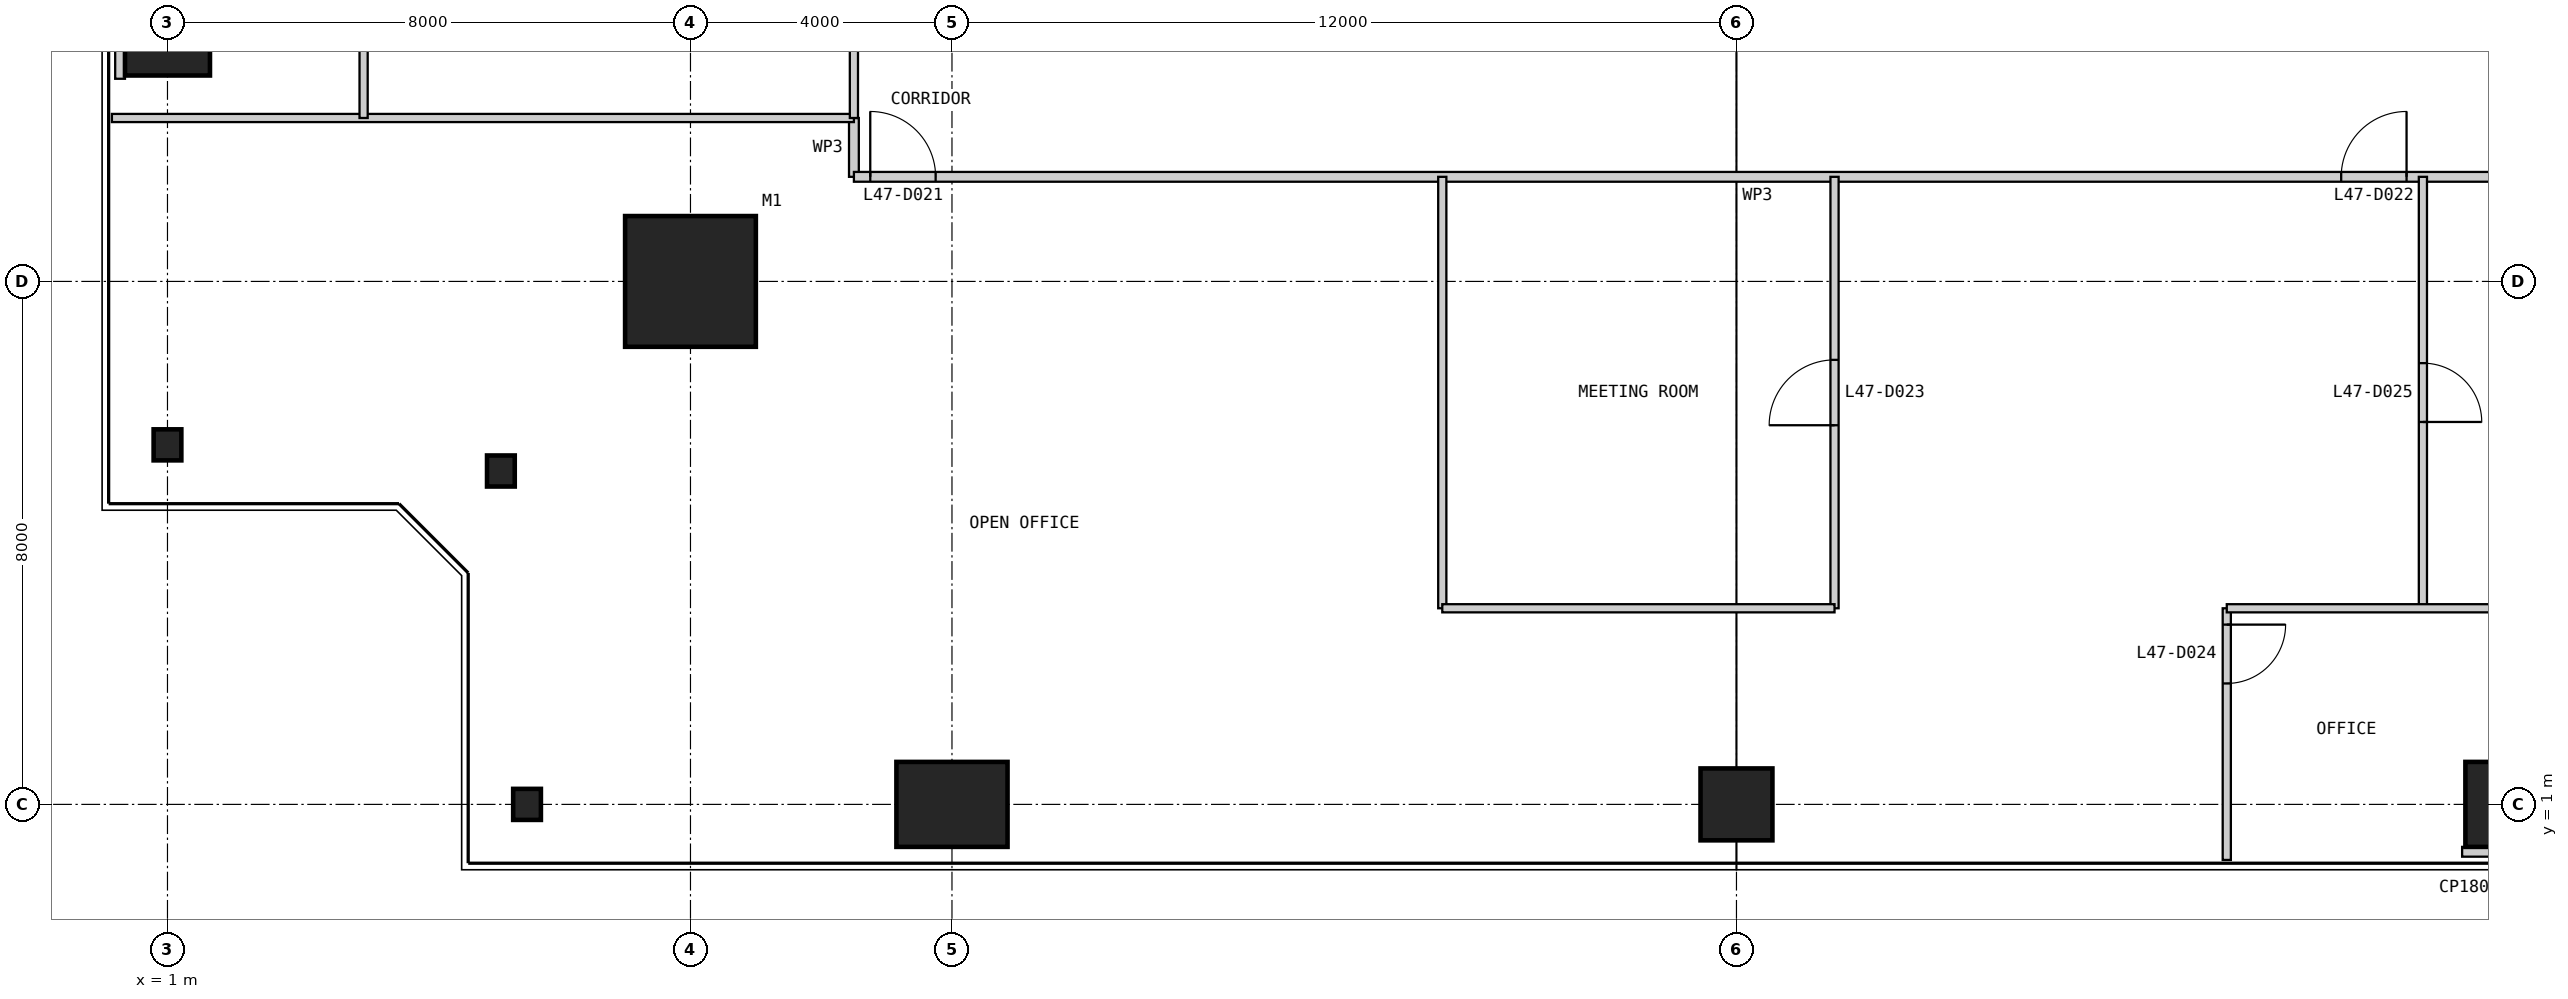
"""IFC4 building model, lengths in metres.
Left out: names, types, materials, properties, quantities, classifications, styles, units other than length and angle.
Written with IfcOpenShell. Run it as: python <this file> out.ifc"""

import sys

from ifc_helpers import new_model, si_unit, direction, frame, frame_2d, origin, origin_2d, place, context, subcontext, project, spatial, rectangle, i_section, extrude, element, fill, save


model = new_model("IFC4")
c1 = context("Model", 3, precision=1e-05, world=origin(), true_north=direction((0.0, 1.0)))
c2 = subcontext(c1, "Body", "Model", "MODEL_VIEW")
j1 = project(units=[si_unit("LENGTHUNIT", "METRE"), si_unit("PLANEANGLEUNIT", "RADIAN")], contexts=[c1])
p1 = place(None, origin())
s1 = spatial("IfcSite", under=j1, at=p1, CompositionType="ELEMENT")
p2 = place(p1, origin())
s2 = spatial("IfcBuilding", under=s1, at=p2, CompositionType="ELEMENT")
p3 = place(p2, frame((0.0, 0.0, 201.8)))
s3 = spatial("IfcBuildingStorey", under=s2, at=p3, CompositionType="ELEMENT", Elevation=201.8)
p4 = place(p3, frame((9.0, 9.0, 0.0), z_axis=(0.0, 0.0, 1.0), x_axis=(1.0, 0.0, 0.0)))
e1 = element("IfcColumn", 1, at=p4, inside=s3, PredefinedType="COLUMN", context=c2, shape_type="SweptSolid", body=[
    extrude(rectangle(XDim=2.0, YDim=2.0, at=origin_2d()), origin(), (0.0, 0.0, 1.0), 4.0),
])
p5 = place(p3, frame((6.5, 1.0, 0.0), z_axis=(0.0, 0.0, 1.0), x_axis=(1.0, 0.0, 0.0)))
e2 = element("IfcColumn", 2, at=p5, inside=s3, PredefinedType="COLUMN", context=c2, shape_type="SweptSolid", body=[
    extrude(i_section(OverallWidth=0.424, OverallDepth=0.475, WebThickness=0.048, FlangeThickness=0.077, at=origin_2d()), origin(), (0.0, 0.0, 1.0), 4.0),
])
p6 = place(p3, frame((13.0, 1.0, 0.0), z_axis=(0.0, 0.0, 1.0), x_axis=(1.0, 0.0, 0.0)))
e3 = element("IfcColumn", 3, at=p6, inside=s3, PredefinedType="COLUMN", context=c2, shape_type="SweptSolid", body=[
    extrude(rectangle(XDim=1.7, YDim=1.3, at=origin_2d()), origin(), (0.0, 0.0, 1.0), 4.0),
])
p7 = place(p3, frame((25.0, 1.0, 0.0), z_axis=(0.0, 0.0, 1.0), x_axis=(1.0, 0.0, 0.0)))
e4 = element("IfcColumn", 4, at=p7, inside=s3, PredefinedType="COLUMN", context=c2, shape_type="SweptSolid", body=[
    extrude(rectangle(XDim=1.1, YDim=1.1, at=origin_2d()), origin(), (0.0, 0.0, 1.0), 4.0),
])
p8 = place(p3, frame((37.0, 1.0, 0.0), z_axis=(0.0, 0.0, 1.0), x_axis=(1.0, 0.0, 0.0)))
e5 = element("IfcColumn", 5, at=p8, inside=s3, PredefinedType="COLUMN", context=c2, shape_type="SweptSolid", body=[
    extrude(rectangle(XDim=1.7, YDim=1.3, at=origin_2d()), origin(), (0.0, 0.0, 1.0), 4.0),
])
p9 = place(p3, frame((1.0, 13.0, 0.0), z_axis=(0.0, 0.0, 1.0), x_axis=(1.0, 0.0, 0.0)))
e6 = element("IfcColumn", 6, at=p9, inside=s3, PredefinedType="COLUMN", context=c2, shape_type="SweptSolid", body=[
    extrude(rectangle(XDim=1.3, YDim=1.7, at=origin_2d()), origin(), (0.0, 0.0, 1.0), 4.0),
])
for number, where, z_axis, x_axis in (
    (7, (1.0, 6.5, 0.0), (0.0, 0.0, 1.0), (1.0, 0.0, 0.0)),
    (8, (6.1, 6.1, 0.0), (0.0, 0.0, 1.0), (1.0, 0.0, 0.0)),
):
    element("IfcColumn", number, at=place(p3, frame(where, z_axis=z_axis, x_axis=x_axis)), inside=s3, PredefinedType="COLUMN", context=c2, shape_type="SweptSolid", body=[
        extrude(i_section(OverallWidth=0.424, OverallDepth=0.475, WebThickness=0.048, FlangeThickness=0.077, at=origin_2d()), origin(), (0.0, 0.0, 1.0), 4.0),
    ])
p10 = place(p3, frame((11.5, 11.5, 0.0), z_axis=(0.0, 0.0, 1.0), x_axis=(0.0, -1.0, 0.0)))
e9 = element("IfcWall", 9, at=p10, inside=s3, PredefinedType="PARTITIONING", context=c2, shape_type="SweptSolid", body=[
    extrude(rectangle(XDim=0.9, YDim=0.15, at=frame_2d((0.45, 0.0))), origin(), (0.0, 0.0, 1.0), 3.85),
])
p11 = place(p3, frame((11.5, 10.6, 0.0), z_axis=(0.0, 0.0, 1.0), x_axis=(1.0, 0.0, 0.0)))
e10 = element("IfcWall", 10, at=p11, inside=s3, PredefinedType="PARTITIONING", context=c2, shape_type="SweptSolid", body=[
    extrude(rectangle(XDim=27.0, YDim=0.15, at=frame_2d((13.5, 0.0))), origin(), (0.0, 0.0, 1.0), 3.85),
])
p12 = place(p11, frame((0.25, 0.0, 0.0)))
e11 = element("IfcOpeningElement", 11, at=p12, cuts=e10, PredefinedType="OPENING", context=c2, shape_type="SweptSolid", body=[
    extrude(rectangle(XDim=1.0, YDim=2.2, at=frame_2d((0.5, 1.1))), frame((0.0, 0.085, 0.0), z_axis=(0.0, -1.0, 0.0), x_axis=(1.0, 0.0, 0.0)), (0.0, 0.0, 1.0), 0.17),
])
p13 = place(p11, frame((22.75, 0.0, 0.0)))
e12 = element("IfcOpeningElement", 12, at=p13, cuts=e10, PredefinedType="OPENING", context=c2, shape_type="SweptSolid", body=[
    extrude(rectangle(XDim=1.0, YDim=2.2, at=frame_2d((0.5, 1.1))), frame((0.0, 0.085, 0.0), z_axis=(0.0, -1.0, 0.0), x_axis=(1.0, 0.0, 0.0)), (0.0, 0.0, 1.0), 0.17),
])
p14 = place(p3, frame((0.15, 11.5, 0.0), z_axis=(0.0, 0.0, 1.0), x_axis=(1.0, 0.0, 0.0)))
e13 = element("IfcWall", 13, at=p14, inside=s3, PredefinedType="PARTITIONING", context=c2, shape_type="SweptSolid", body=[
    extrude(rectangle(XDim=11.35, YDim=0.125, at=frame_2d((5.675, 0.0))), origin(), (0.0, 0.0, 1.0), 3.85),
])
p15 = place(p3, frame((20.5, 4.0, 0.0), z_axis=(0.0, 0.0, 1.0), x_axis=(0.0, 1.0, 0.0)))
e14 = element("IfcWall", 14, at=p15, inside=s3, PredefinedType="PARTITIONING", context=c2, shape_type="SweptSolid", body=[
    extrude(rectangle(XDim=6.6, YDim=0.125, at=frame_2d((3.3, 0.0))), origin(), (0.0, 0.0, 1.0), 3.85),
])
p16 = place(p3, frame((26.5, 4.0, 0.0), z_axis=(0.0, 0.0, 1.0), x_axis=(0.0, 1.0, 0.0)))
e15 = element("IfcWall", 15, at=p16, inside=s3, PredefinedType="PARTITIONING", context=c2, shape_type="SweptSolid", body=[
    extrude(rectangle(XDim=6.6, YDim=0.125, at=frame_2d((3.3, 0.0))), origin(), (0.0, 0.0, 1.0), 3.85),
])
p17 = place(p16, frame((2.8, 0.0, 0.0)))
e16 = element("IfcOpeningElement", 16, at=p17, cuts=e15, PredefinedType="OPENING", context=c2, shape_type="SweptSolid", body=[
    extrude(rectangle(XDim=1.0, YDim=2.2, at=frame_2d((0.5, 1.1))), frame((0.0, 0.073, 0.0), z_axis=(0.0, -1.0, 0.0), x_axis=(1.0, 0.0, 0.0)), (0.0, 0.0, 1.0), 0.145),
])
p18 = place(p3, frame((32.5, 0.15, 0.0), z_axis=(0.0, 0.0, 1.0), x_axis=(0.0, 1.0, 0.0)))
e17 = element("IfcWall", 17, at=p18, inside=s3, PredefinedType="PARTITIONING", context=c2, shape_type="SweptSolid", body=[
    extrude(rectangle(XDim=3.85, YDim=0.125, at=frame_2d((1.925, 0.0))), origin(), (0.0, 0.0, 1.0), 3.85),
])
p19 = place(p18, frame((2.7, 0.0, 0.0)))
e18 = element("IfcOpeningElement", 18, at=p19, cuts=e17, PredefinedType="OPENING", context=c2, shape_type="SweptSolid", body=[
    extrude(rectangle(XDim=0.9, YDim=2.2, at=frame_2d((0.45, 1.1))), frame((0.0, 0.073, 0.0), z_axis=(0.0, -1.0, 0.0), x_axis=(1.0, 0.0, 0.0)), (0.0, 0.0, 1.0), 0.145),
])
p20 = place(p3, frame((35.5, 4.0, 0.0), z_axis=(0.0, 0.0, 1.0), x_axis=(0.0, 1.0, 0.0)))
e19 = element("IfcWall", 19, at=p20, inside=s3, PredefinedType="PARTITIONING", context=c2, shape_type="SweptSolid", body=[
    extrude(rectangle(XDim=6.6, YDim=0.125, at=frame_2d((3.3, 0.0))), origin(), (0.0, 0.0, 1.0), 3.85),
])
p21 = place(p20, frame((2.85, 0.0, 0.0)))
e20 = element("IfcOpeningElement", 20, at=p21, cuts=e19, PredefinedType="OPENING", context=c2, shape_type="SweptSolid", body=[
    extrude(rectangle(XDim=0.9, YDim=2.2, at=frame_2d((0.45, 1.1))), frame((0.0, 0.073, 0.0), z_axis=(0.0, -1.0, 0.0), x_axis=(1.0, 0.0, 0.0)), (0.0, 0.0, 1.0), 0.145),
])
for number, where, z_axis, x_axis in (
    (21, (20.5, 4.0, 0.0), (0.0, 0.0, 1.0), (1.0, 0.0, 0.0)),
    (22, (32.5, 4.0, 0.0), (0.0, 0.0, 1.0), (1.0, 0.0, 0.0)),
):
    element("IfcWall", number, at=place(p3, frame(where, z_axis=z_axis, x_axis=x_axis)), inside=s3, PredefinedType="PARTITIONING", context=c2, shape_type="SweptSolid", body=[
        extrude(rectangle(XDim=6.0, YDim=0.125, at=frame_2d((3.0, 0.0))), origin(), (0.0, 0.0, 1.0), 3.85),
    ])
p22 = place(p3, frame((4.0, 17.5, 0.0), z_axis=(0.0, 0.0, 1.0), x_axis=(0.0, -1.0, 0.0)))
e23 = element("IfcWall", 23, at=p22, inside=s3, PredefinedType="PARTITIONING", context=c2, shape_type="SweptSolid", body=[
    extrude(rectangle(XDim=6.0, YDim=0.125, at=frame_2d((3.0, 0.0))), origin(), (0.0, 0.0, 1.0), 3.238),
])
p23 = place(p3, frame((11.5, 14.5, 0.0), z_axis=(0.0, 0.0, 1.0), x_axis=(0.0, -1.0, 0.0)))
e24 = element("IfcWall", 24, at=p23, inside=s3, PredefinedType="PARTITIONING", context=c2, shape_type="SweptSolid", body=[
    extrude(rectangle(XDim=3.0, YDim=0.125, at=frame_2d((1.5, 0.0))), origin(), (0.0, 0.0, 1.0), 3.85),
])
for number, where, z_axis, x_axis in (
    (25, (37.0, 0.2, 0.0), (0.0, 0.0, 1.0), (0.0, 1.0, 0.0)),
    (26, (0.2, 13.0, 0.0), (0.0, 0.0, 1.0), (1.0, 0.0, 0.0)),
):
    element("IfcWall", number, at=place(p3, frame(where, z_axis=z_axis, x_axis=x_axis)), inside=s3, PredefinedType="PARTITIONING", context=c2, shape_type="SweptSolid", body=[
        extrude(rectangle(XDim=0.15, YDim=1.8, at=frame_2d((0.075, 0.0))), origin(), (0.0, 0.0, 1.0), 3.85),
    ])
p24 = place(p12, origin())
e27 = element("IfcDoor", 27, at=p24, inside=s3, OperationType="SINGLE_SWING_LEFT", PredefinedType="DOOR", context=c2, shape_type="SweptSolid", body=[
    extrude(rectangle(XDim=1.0, YDim=2.2, at=frame_2d((0.5, 1.1))), frame((0.0, 0.025, 0.0), z_axis=(0.0, -1.0, 0.0), x_axis=(1.0, 0.0, 0.0)), (0.0, 0.0, 1.0), 0.05),
])
fill(e11, e27)
p25 = place(p13, origin())
e28 = element("IfcDoor", 28, at=p25, inside=s3, OperationType="SINGLE_SWING_RIGHT", PredefinedType="DOOR", context=c2, shape_type="SweptSolid", body=[
    extrude(rectangle(XDim=1.0, YDim=2.2, at=frame_2d((0.5, 1.1))), frame((0.0, 0.025, 0.0), z_axis=(0.0, -1.0, 0.0), x_axis=(1.0, 0.0, 0.0)), (0.0, 0.0, 1.0), 0.05),
])
fill(e12, e28)
p26 = place(p17, origin())
e29 = element("IfcDoor", 29, at=p26, inside=s3, OperationType="SINGLE_SWING_LEFT", PredefinedType="DOOR", context=c2, shape_type="SweptSolid", body=[
    extrude(rectangle(XDim=1.0, YDim=2.2, at=frame_2d((0.5, 1.1))), frame((0.0, 0.025, 0.0), z_axis=(0.0, -1.0, 0.0), x_axis=(1.0, 0.0, 0.0)), (0.0, 0.0, 1.0), 0.05),
])
fill(e16, e29)
p27 = place(p19, frame((0.9, 0.0, 0.0), z_axis=(0.0, 0.0, 1.0), x_axis=(-1.0, 0.0, 0.0)))
e30 = element("IfcDoor", 30, at=p27, inside=s3, OperationType="SINGLE_SWING_LEFT", PredefinedType="DOOR", context=c2, shape_type="SweptSolid", body=[
    extrude(rectangle(XDim=0.9, YDim=2.2, at=frame_2d((0.45, 1.1))), frame((0.0, 0.025, 0.0), z_axis=(0.0, -1.0, 0.0), x_axis=(1.0, 0.0, 0.0)), (0.0, 0.0, 1.0), 0.05),
])
fill(e18, e30)
p28 = place(p21, frame((0.9, 0.0, 0.0), z_axis=(0.0, 0.0, 1.0), x_axis=(-1.0, 0.0, 0.0)))
e31 = element("IfcDoor", 31, at=p28, inside=s3, OperationType="SINGLE_SWING_RIGHT", PredefinedType="DOOR", context=c2, shape_type="SweptSolid", body=[
    extrude(rectangle(XDim=0.9, YDim=2.2, at=frame_2d((0.45, 1.1))), frame((0.0, 0.025, 0.0), z_axis=(0.0, -1.0, 0.0), x_axis=(1.0, 0.0, 0.0)), (0.0, 0.0, 1.0), 0.05),
])
fill(e20, e31)
save(model, sys.argv[1])
